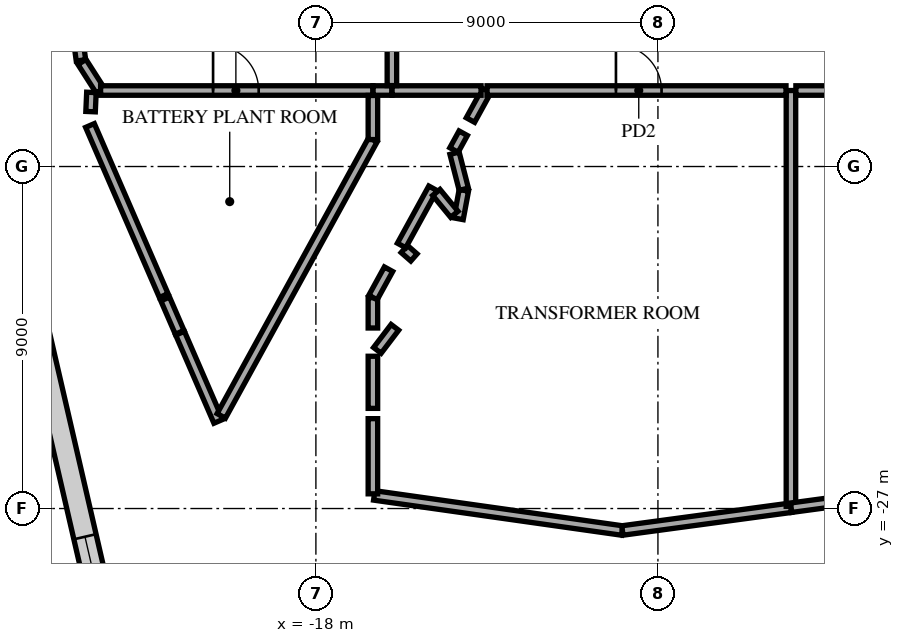
"""IFC4 building model, lengths in metres.
Left out: names, types, materials, properties, quantities, classifications, styles, units other than length and angle.
Written with IfcOpenShell. Run it as: python <this file> out.ifc"""

import sys

from ifc_helpers import new_model, si_unit, direction, frame, frame_2d, origin, place, context, subcontext, project, spatial, rectangle, extrude, element, fill, save


model = new_model("IFC4")
c1 = context("Model", 3, precision=1e-05, world=origin(), true_north=direction((0.0, 1.0)))
c2 = subcontext(c1, "Body", "Model", "MODEL_VIEW")
j1 = project(units=[si_unit("LENGTHUNIT", "METRE"), si_unit("PLANEANGLEUNIT", "RADIAN")], contexts=[c1])
p1 = place(None, origin())
s1 = spatial("IfcSite", under=j1, at=p1, CompositionType="ELEMENT")
p2 = place(p1, origin())
s2 = spatial("IfcBuilding", under=s1, at=p2, CompositionType="ELEMENT")
p3 = place(p2, frame((0.0, 0.0, 76.5)))
s3 = spatial("IfcBuildingStorey", under=s2, at=p3, CompositionType="ELEMENT", Elevation=76.5)
p4 = place(p3, frame((-16.465, -26.655, 0.0), z_axis=(0.0, 0.0, 1.0), x_axis=(0.990129482874, -0.140155653273, 0.0)))
e1 = element("IfcWall", 1, at=p4, inside=s3, PredefinedType="PARTITIONING", context=c2, shape_type="SweptSolid", body=[
    extrude(rectangle(XDim=6.59, YDim=0.25, at=frame_2d((3.295, 0.0))), origin(), (0.0, 0.0, 1.0), 4.06),
])
p5 = place(p3, frame((-9.935, -27.578, 0.0), z_axis=(0.0, 0.0, 1.0), x_axis=(0.991013159692, 0.133764409753, 0.0)))
e2 = element("IfcWall", 2, at=p5, inside=s3, PredefinedType="PARTITIONING", context=c2, shape_type="SweptSolid", body=[
    extrude(rectangle(XDim=4.475, YDim=0.25, at=frame_2d((2.238, 0.0))), origin(), (0.0, 0.0, 1.0), 4.56),
])
p6 = place(p3, frame((-5.5, -26.942, 0.0), z_axis=(0.0, 0.0, 1.0), x_axis=(0.0, 1.0, 0.0)))
e3 = element("IfcWall", 3, at=p6, inside=s3, PredefinedType="PARTITIONING", context=c2, shape_type="SweptSolid", body=[
    extrude(rectangle(XDim=10.942, YDim=0.25, at=frame_2d((5.471, 0.0))), origin(), (0.0, 0.0, 1.0), 5.18),
])
p7 = place(p3, frame((-16.5, -26.613, 0.0), z_axis=(0.0, 0.0, 1.0), x_axis=(0.0, 1.0, 0.0)))
e4 = element("IfcWall", 4, at=p7, inside=s3, PredefinedType="PARTITIONING", context=c2, shape_type="SweptSolid", body=[
    extrude(rectangle(XDim=1.978, YDim=0.25, at=frame_2d((0.989, 0.0))), origin(), (0.0, 0.0, 1.0), 5.18),
])
p8 = place(p3, frame((-5.495, -26.979, 0.0), z_axis=(0.0, 0.0, 1.0), x_axis=(0.991006637974, 0.133812717975, 0.0)))
e5 = element("IfcWall", 5, at=p8, inside=s3, PredefinedType="PARTITIONING", context=c2, shape_type="SweptSolid", body=[
    extrude(rectangle(XDim=9.057, YDim=0.25, at=frame_2d((4.528, 0.0))), origin(), (0.0, 0.0, 1.0), 4.56),
])
p9 = place(p3, frame((-21.575, -22.387, 0.0), z_axis=(0.0, 0.0, 1.0), x_axis=(0.397843188521, -0.917453430615, 0.0)))
e6 = element("IfcWall", 6, at=p9, inside=s3, PredefinedType="PARTITIONING", context=c2, shape_type="SweptSolid", body=[
    extrude(rectangle(XDim=2.528, YDim=0.25, at=frame_2d((1.264, 0.0))), origin(), (0.0, 0.0, 1.0), 5.18),
])
p10 = place(p3, frame((-16.5, -24.365, 0.0), z_axis=(0.0, 0.0, 1.0), x_axis=(0.0, 1.0, 0.0)))
e7 = element("IfcWall", 7, at=p10, inside=s3, PredefinedType="PARTITIONING", context=c2, shape_type="SweptSolid", body=[
    extrude(rectangle(XDim=1.372, YDim=0.25, at=frame_2d((0.686, 0.0))), origin(), (0.0, 0.0, 1.0), 4.56),
])
p11 = place(p3, frame((-16.383, -22.838, 0.0), z_axis=(0.0, 0.0, 1.0), x_axis=(0.605473287188, 0.795865628421, 0.0)))
e8 = element("IfcWall", 8, at=p11, inside=s3, PredefinedType="PARTITIONING", context=c2, shape_type="SweptSolid", body=[
    extrude(rectangle(XDim=0.762, YDim=0.25, at=frame_2d((0.381, 0.0))), origin(), (0.0, 0.0, 1.0), 4.56),
])
p12 = place(p3, frame((-21.966, -21.485, 0.0), z_axis=(0.0, 0.0, 1.0), x_axis=(0.397728990261, -0.917502942941, 0.0)))
e9 = element("IfcWall", 9, at=p12, inside=s3, PredefinedType="PARTITIONING", context=c2, shape_type="SweptSolid", body=[
    extrude(rectangle(XDim=0.958, YDim=0.25, at=frame_2d((0.479, 0.0))), origin(), (0.0, 0.0, 1.0), 5.18),
])
p13 = place(p3, frame((-16.5, -22.25, 0.0), z_axis=(0.0, 0.0, 1.0), x_axis=(0.0, 1.0, 0.0)))
e10 = element("IfcWall", 10, at=p13, inside=s3, PredefinedType="PARTITIONING", context=c2, shape_type="SweptSolid", body=[
    extrude(rectangle(XDim=0.798, YDim=0.25, at=frame_2d((0.399, 0.0))), origin(), (0.0, 0.0, 1.0), 4.56),
])
p14 = place(p3, frame((-16.497, -21.447, 0.0), z_axis=(0.0, 0.0, 1.0), x_axis=(0.481388785927, 0.87650718011, 0.0)))
e11 = element("IfcWall", 11, at=p14, inside=s3, PredefinedType="PARTITIONING", context=c2, shape_type="SweptSolid", body=[
    extrude(rectangle(XDim=0.849, YDim=0.25, at=frame_2d((0.424, 0.0))), origin(), (0.0, 0.0, 1.0), 4.56),
])
p15 = place(p3, frame((-23.945, -16.92, 0.0), z_axis=(0.0, 0.0, 1.0), x_axis=(0.397805453774, -0.917469792935, 0.0)))
e12 = element("IfcWall", 12, at=p15, inside=s3, PredefinedType="PARTITIONING", context=c2, shape_type="SweptSolid", body=[
    extrude(rectangle(XDim=4.878, YDim=0.25, at=frame_2d((2.439, 0.0))), origin(), (0.0, 0.0, 1.0), 5.18),
])
p16 = place(p3, frame((-15.674, -20.17, 0.0), z_axis=(0.0, 0.0, 1.0), x_axis=(0.752576694707, -0.658504607869, 0.0)))
e13 = element("IfcWall", 13, at=p16, inside=s3, PredefinedType="PARTITIONING", context=c2, shape_type="SweptSolid", body=[
    extrude(rectangle(XDim=0.337, YDim=0.25, at=frame_2d((0.169, 0.0))), origin(), (0.0, 0.0, 1.0), 4.56),
])
p17 = place(p3, frame((-15.746, -20.078, 0.0), z_axis=(0.0, 0.0, 1.0), x_axis=(0.481372431238, 0.876516162112, 0.0)))
e14 = element("IfcWall", 14, at=p17, inside=s3, PredefinedType="PARTITIONING", context=c2, shape_type="SweptSolid", body=[
    extrude(rectangle(XDim=1.716, YDim=0.25, at=frame_2d((0.858, 0.0))), origin(), (0.0, 0.0, 1.0), 4.56),
])
p18 = place(p3, frame((-14.247, -19.375, 0.0), z_axis=(0.0, 0.0, 1.0), x_axis=(0.183340179713, 0.983049530035, 0.0)))
e15 = element("IfcWall", 15, at=p18, inside=s3, PredefinedType="PARTITIONING", context=c2, shape_type="SweptSolid", body=[
    extrude(rectangle(XDim=0.762, YDim=0.25, at=frame_2d((0.381, 0.0))), origin(), (0.0, 0.0, 1.0), 5.18),
])
p19 = place(p3, frame((-14.352, -17.65, 0.0), z_axis=(0.0, 0.0, 1.0), x_axis=(0.249107932403, -0.968475729182, 0.0)))
e16 = element("IfcWall", 16, at=p19, inside=s3, PredefinedType="PARTITIONING", context=c2, shape_type="SweptSolid", body=[
    extrude(rectangle(XDim=0.978, YDim=0.25, at=frame_2d((0.489, 0.0))), origin(), (0.0, 0.0, 1.0), 4.56),
])
p20 = place(p3, frame((-14.831, -18.682, 0.0), z_axis=(0.0, 0.0, 1.0), x_axis=(0.635179194616, -0.772364804174, 0.0)))
e17 = element("IfcWall", 17, at=p20, inside=s3, PredefinedType="PARTITIONING", context=c2, shape_type="SweptSolid", body=[
    extrude(rectangle(XDim=0.746, YDim=0.25, at=frame_2d((0.373, 0.0))), origin(), (0.0, 0.0, 1.0), 4.56),
])
p21 = place(p3, frame((-14.366, -17.566, 0.0), z_axis=(0.0, 0.0, 1.0), x_axis=(0.481193101947, 0.876614623788, 0.0)))
e18 = element("IfcWall", 18, at=p21, inside=s3, PredefinedType="PARTITIONING", context=c2, shape_type="SweptSolid", body=[
    extrude(rectangle(XDim=0.504, YDim=0.25, at=frame_2d((0.252, 0.0))), origin(), (0.0, 0.0, 1.0), 4.56),
])
p22 = place(p3, frame((-20.49, -24.562, 0.0), z_axis=(0.0, 0.0, 1.0), x_axis=(0.481308069685, 0.876551505649, 0.0)))
e19 = element("IfcWall", 19, at=p22, inside=s3, PredefinedType="PARTITIONING", context=c2, shape_type="SweptSolid", body=[
    extrude(rectangle(XDim=8.289, YDim=0.25, at=frame_2d((4.145, 0.0))), origin(), (0.0, 0.0, 1.0), 4.152),
])
p23 = place(p3, frame((-13.933, -16.777, 0.0), z_axis=(0.0, 0.0, 1.0), x_axis=(0.481262962693, 0.876576272061, 0.0)))
e20 = element("IfcWall", 20, at=p23, inside=s3, PredefinedType="PARTITIONING", context=c2, shape_type="SweptSolid", body=[
    extrude(rectangle(XDim=0.886, YDim=0.25, at=frame_2d((0.443, 0.0))), origin(), (0.0, 0.0, 1.0), 4.56),
])
p24 = place(p3, frame((-23.929, -16.556, 0.0), z_axis=(0.0, 0.0, 1.0), x_axis=(0.043395375448, 0.999057976991, 0.0)))
e21 = element("IfcWall", 21, at=p24, inside=s3, PredefinedType="PARTITIONING", context=c2, shape_type="SweptSolid", body=[
    extrude(rectangle(XDim=0.506, YDim=0.25, at=frame_2d((0.253, 0.0))), origin(), (0.0, 0.0, 1.0), 5.18),
])
p25 = place(p3, frame((-24.155, -15.249, 0.0), z_axis=(0.0, 0.0, 1.0), x_axis=(0.539069226366, -0.842261461297, 0.0)))
e22 = element("IfcWall", 22, at=p25, inside=s3, PredefinedType="PARTITIONING", context=c2, shape_type="SweptSolid", body=[
    extrude(rectangle(XDim=0.892, YDim=0.25, at=frame_2d((0.446, 0.0))), origin(), (0.0, 0.0, 1.0), 5.18),
])
p26 = place(p3, frame((-23.665, -16.0, 0.0), z_axis=(0.0, 0.0, 1.0), x_axis=(1.0, 0.0, 0.0)))
e23 = element("IfcWall", 23, at=p26, inside=s3, PredefinedType="PARTITIONING", context=c2, shape_type="SweptSolid", body=[
    extrude(rectangle(XDim=7.165, YDim=0.25, at=frame_2d((3.583, 0.0))), origin(), (0.0, 0.0, 1.0), 4.152),
])
p27 = place(p26, frame((2.96, 0.0, 0.0)))
e24 = element("IfcOpeningElement", 24, at=p27, cuts=e23, PredefinedType="OPENING", context=c2, shape_type="SweptSolid", body=[
    extrude(rectangle(XDim=1.2, YDim=2.1, at=frame_2d((0.6, 1.05))), frame((0.0, 0.135, 0.0), z_axis=(0.0, -1.0, 0.0), x_axis=(1.0, 0.0, 0.0)), (0.0, 0.0, 1.0), 0.27),
])
p28 = place(p3, frame((-16.5, -17.291, 0.0), z_axis=(0.0, 0.0, 1.0), x_axis=(0.0, 1.0, 0.0)))
e25 = element("IfcWall", 25, at=p28, inside=s3, PredefinedType="PARTITIONING", context=c2, shape_type="SweptSolid", body=[
    extrude(rectangle(XDim=1.161, YDim=0.25, at=frame_2d((0.581, 0.0))), origin(), (0.0, 0.0, 1.0), 4.56),
])
p29 = place(p3, frame((-16.495, -16.0, 0.0), z_axis=(0.0, 0.0, 1.0), x_axis=(1.0, 0.0, 0.0)))
e26 = element("IfcWall", 26, at=p29, inside=s3, PredefinedType="PARTITIONING", context=c2, shape_type="SweptSolid", body=[
    extrude(rectangle(XDim=0.495, YDim=0.25, at=frame_2d((0.248, 0.0))), origin(), (0.0, 0.0, 1.0), 4.56),
])
p30 = place(p3, frame((-15.995, -16.0, 0.0), z_axis=(0.0, 0.0, 1.0), x_axis=(1.0, 0.0, 0.0)))
e27 = element("IfcWall", 27, at=p30, inside=s3, PredefinedType="PARTITIONING", context=c2, shape_type="SweptSolid", body=[
    extrude(rectangle(XDim=2.34, YDim=0.25, at=frame_2d((1.17, 0.0))), origin(), (0.0, 0.0, 1.0), 4.56),
])
p31 = place(p3, frame((-13.496, -16.0, 0.0), z_axis=(0.0, 0.0, 1.0), x_axis=(1.0, 0.0, 0.0)))
e28 = element("IfcWall", 28, at=p31, inside=s3, PredefinedType="PARTITIONING", context=c2, shape_type="SweptSolid", body=[
    extrude(rectangle(XDim=7.866, YDim=0.25, at=frame_2d((3.933, 0.0))), origin(), (0.0, 0.0, 1.0), 4.06),
])
p32 = place(p31, frame((3.392, 0.0, 0.0)))
e29 = element("IfcOpeningElement", 29, at=p32, cuts=e28, PredefinedType="OPENING", context=c2, shape_type="SweptSolid", body=[
    extrude(rectangle(XDim=1.2, YDim=2.1, at=frame_2d((0.6, 1.05))), frame((0.0, 0.135, 0.0), z_axis=(0.0, -1.0, 0.0), x_axis=(1.0, 0.0, 0.0)), (0.0, 0.0, 1.0), 0.27),
])
p33 = place(p3, frame((-5.37, -16.0, 0.0), z_axis=(0.0, 0.0, 1.0), x_axis=(1.0, 0.0, 0.0)))
e30 = element("IfcWall", 30, at=p33, inside=s3, PredefinedType="PARTITIONING", context=c2, shape_type="SweptSolid", body=[
    extrude(rectangle(XDim=8.74, YDim=0.25, at=frame_2d((4.37, 0.0))), origin(), (0.0, 0.0, 1.0), 4.56),
])
p34 = place(p33, frame((3.77, 0.0, 0.0)))
e31 = element("IfcOpeningElement", 31, at=p34, cuts=e30, PredefinedType="OPENING", context=c2, shape_type="SweptSolid", body=[
    extrude(rectangle(XDim=1.2, YDim=2.1, at=frame_2d((0.6, 1.05))), frame((0.0, 0.135, 0.0), z_axis=(0.0, -1.0, 0.0), x_axis=(1.0, 0.0, 0.0)), (0.0, 0.0, 1.0), 0.27),
])
p35 = place(p3, frame((-25.291, -7.0, 0.0), z_axis=(0.0, 0.0, 1.0), x_axis=(0.133909288136, -0.990993593597, 0.0)))
e32 = element("IfcWall", 32, at=p35, inside=s3, PredefinedType="PARTITIONING", context=c2, shape_type="SweptSolid", body=[
    extrude(rectangle(XDim=8.281, YDim=0.25, at=frame_2d((4.14, 0.0))), origin(), (0.0, 0.0, 1.0), 4.152),
])
p36 = place(p3, frame((-16.0, -15.87, 0.0), z_axis=(0.0, 0.0, 1.0), x_axis=(0.0, 1.0, 0.0)))
e33 = element("IfcWall", 33, at=p36, inside=s3, PredefinedType="PARTITIONING", context=c2, shape_type="SweptSolid", body=[
    extrude(rectangle(XDim=8.74, YDim=0.25, at=frame_2d((4.37, 0.0))), origin(), (0.0, 0.0, 1.0), 4.56),
])
p37 = place(p36, frame((3.77, 0.0, 0.0)))
e34 = element("IfcOpeningElement", 34, at=p37, cuts=e33, PredefinedType="OPENING", context=c2, shape_type="SweptSolid", body=[
    extrude(rectangle(XDim=1.2, YDim=2.1, at=frame_2d((0.6, 1.05))), frame((0.0, 0.135, 0.0), z_axis=(0.0, -1.0, 0.0), x_axis=(1.0, 0.0, 0.0)), (0.0, 0.0, 1.0), 0.27),
])
p38 = place(p3, frame((-34.535, 17.557, 0.0), z_axis=(0.0, 0.0, 1.0), x_axis=(0.224951253923, -0.974370018709, 0.0)))
e35 = element("IfcWall", 35, at=p38, inside=s3, PredefinedType="STANDARD", context=c2, shape_type="SweptSolid", body=[
    extrude(rectangle(XDim=49.751, YDim=0.6, at=frame_2d((24.876, 0.0))), origin(), (0.0, 0.0, 1.0), 5.18),
])
p39 = place(p38, frame((1.161, 0.0, 0.6)))
e36 = element("IfcOpeningElement", 36, at=p39, cuts=e35, PredefinedType="OPENING", context=c2, shape_type="SweptSolid", body=[
    extrude(rectangle(XDim=2.1, YDim=4.13, at=frame_2d((1.05, 2.065))), frame((0.0, 0.31, 0.0), z_axis=(0.0, -1.0, 0.0), x_axis=(1.0, 0.0, 0.0)), (0.0, 0.0, 1.0), 0.62),
])
p40 = place(p38, frame((5.644, 0.0, 0.6)))
e37 = element("IfcOpeningElement", 37, at=p40, cuts=e35, PredefinedType="OPENING", context=c2, shape_type="SweptSolid", body=[
    extrude(rectangle(XDim=2.1, YDim=4.13, at=frame_2d((1.05, 2.065))), frame((0.0, 0.31, 0.0), z_axis=(0.0, -1.0, 0.0), x_axis=(1.0, 0.0, 0.0)), (0.0, 0.0, 1.0), 0.62),
])
p41 = place(p38, frame((46.491, 0.0, 0.6)))
e38 = element("IfcOpeningElement", 38, at=p41, cuts=e35, PredefinedType="OPENING", context=c2, shape_type="SweptSolid", body=[
    extrude(rectangle(XDim=2.1, YDim=4.13, at=frame_2d((1.05, 2.065))), frame((0.0, 0.31, 0.0), z_axis=(0.0, -1.0, 0.0), x_axis=(1.0, 0.0, 0.0)), (0.0, 0.0, 1.0), 0.62),
])
p42 = place(p3, frame((-17.557, -34.535, 0.0), z_axis=(0.0, 0.0, 1.0), x_axis=(0.974370018709, 0.224951253923, 0.0)))
e39 = element("IfcWall", 39, at=p42, inside=s3, PredefinedType="STANDARD", context=c2, shape_type="SweptSolid", body=[
    extrude(rectangle(XDim=49.751, YDim=0.6, at=frame_2d((24.876, 0.0))), origin(), (0.0, 0.0, 1.0), 5.18),
])
p43 = place(p42, frame((1.161, 0.0, 0.6)))
e40 = element("IfcOpeningElement", 40, at=p43, cuts=e39, PredefinedType="OPENING", context=c2, shape_type="SweptSolid", body=[
    extrude(rectangle(XDim=2.1, YDim=4.13, at=frame_2d((1.05, 2.065))), frame((0.0, 0.31, 0.0), z_axis=(0.0, -1.0, 0.0), x_axis=(1.0, 0.0, 0.0)), (0.0, 0.0, 1.0), 0.62),
])
p44 = place(p42, frame((5.644, 0.0, 0.6)))
e41 = element("IfcOpeningElement", 41, at=p44, cuts=e39, PredefinedType="OPENING", context=c2, shape_type="SweptSolid", body=[
    extrude(rectangle(XDim=2.1, YDim=4.13, at=frame_2d((1.05, 2.065))), frame((0.0, 0.31, 0.0), z_axis=(0.0, -1.0, 0.0), x_axis=(1.0, 0.0, 0.0)), (0.0, 0.0, 1.0), 0.62),
])
p45 = place(p42, frame((10.189, 0.0, 0.6)))
e42 = element("IfcOpeningElement", 42, at=p45, cuts=e39, PredefinedType="OPENING", context=c2, shape_type="SweptSolid", body=[
    extrude(rectangle(XDim=2.1, YDim=4.13, at=frame_2d((1.05, 2.065))), frame((0.0, 0.31, 0.0), z_axis=(0.0, -1.0, 0.0), x_axis=(1.0, 0.0, 0.0)), (0.0, 0.0, 1.0), 0.62),
])
p46 = place(p42, frame((14.735, 0.0, 0.6)))
e43 = element("IfcOpeningElement", 43, at=p46, cuts=e39, PredefinedType="OPENING", context=c2, shape_type="SweptSolid", body=[
    extrude(rectangle(XDim=2.1, YDim=4.13, at=frame_2d((1.05, 2.065))), frame((0.0, 0.31, 0.0), z_axis=(0.0, -1.0, 0.0), x_axis=(1.0, 0.0, 0.0)), (0.0, 0.0, 1.0), 0.62),
])
p47 = place(p42, frame((19.28, 0.0, 0.6)))
e44 = element("IfcOpeningElement", 44, at=p47, cuts=e39, PredefinedType="OPENING", context=c2, shape_type="SweptSolid", body=[
    extrude(rectangle(XDim=2.1, YDim=4.13, at=frame_2d((1.05, 2.065))), frame((0.0, 0.31, 0.0), z_axis=(0.0, -1.0, 0.0), x_axis=(1.0, 0.0, 0.0)), (0.0, 0.0, 1.0), 0.62),
])
p48 = place(p42, frame((46.491, 0.0, 0.6)))
e45 = element("IfcOpeningElement", 45, at=p48, cuts=e39, PredefinedType="OPENING", context=c2, shape_type="SweptSolid", body=[
    extrude(rectangle(XDim=2.1, YDim=4.13, at=frame_2d((1.05, 2.065))), frame((0.0, 0.31, 0.0), z_axis=(0.0, -1.0, 0.0), x_axis=(1.0, 0.0, 0.0)), (0.0, 0.0, 1.0), 0.62),
])
p49 = place(p32, origin())
e46 = element("IfcDoor", 46, at=p49, inside=s3, OperationType="SINGLE_SWING_RIGHT", PredefinedType="DOOR", context=c2, shape_type="SweptSolid", body=[
    extrude(rectangle(XDim=1.2, YDim=2.1, at=frame_2d((0.6, 1.05))), frame((0.0, 0.025, 0.0), z_axis=(0.0, -1.0, 0.0), x_axis=(1.0, 0.0, 0.0)), (0.0, 0.0, 1.0), 0.05),
])
fill(e29, e46)
p50 = place(p27, origin())
e47 = element("IfcDoor", 47, at=p50, inside=s3, OperationType="SINGLE_SWING_RIGHT", PredefinedType="DOOR", context=c2, shape_type="SweptSolid", body=[
    extrude(rectangle(XDim=1.2, YDim=2.1, at=frame_2d((0.6, 1.05))), frame((0.0, 0.025, 0.0), z_axis=(0.0, -1.0, 0.0), x_axis=(1.0, 0.0, 0.0)), (0.0, 0.0, 1.0), 0.05),
])
fill(e24, e47)
p51 = place(p41, origin())
e48 = element("IfcWindow", 48, at=p51, inside=s3, PartitioningType="SINGLE_PANEL", PredefinedType="USERDEFINED", context=c2, shape_type="SweptSolid", body=[
    extrude(rectangle(XDim=2.1, YDim=4.13, at=frame_2d((1.05, 2.065))), frame((0.0, 0.03, 0.0), z_axis=(0.0, -1.0, 0.0), x_axis=(1.0, 0.0, 0.0)), (0.0, 0.0, 1.0), 0.06),
])
fill(e38, e48)
save(model, sys.argv[1])
